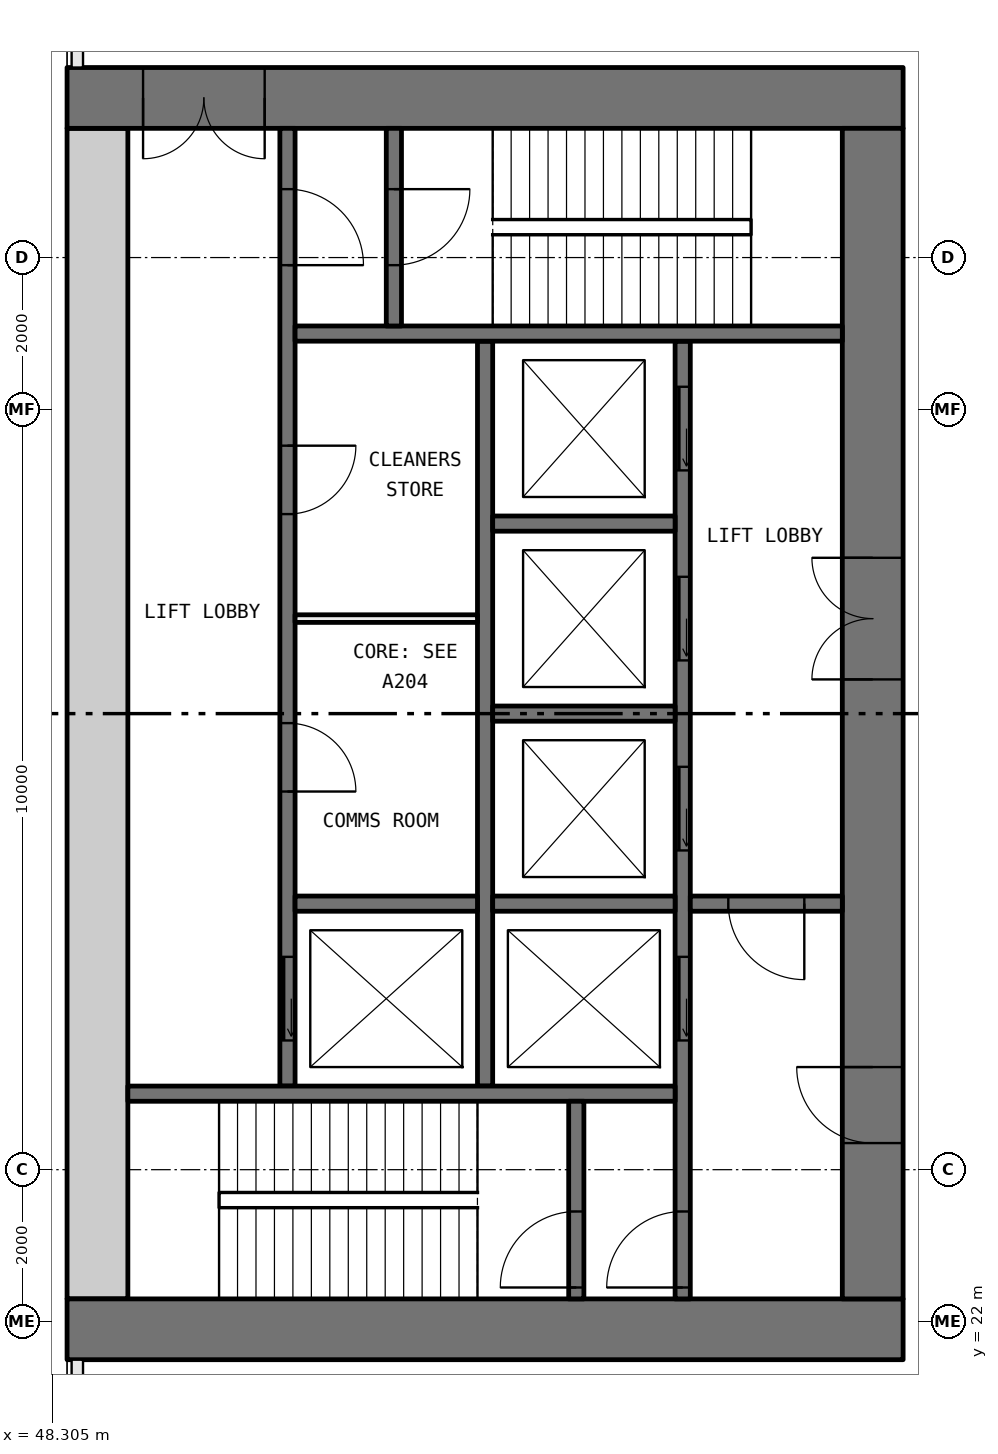
"""IFC4 building model, lengths in metres.
Left out: names, types, materials, properties, quantities, classifications, styles, units other than length and angle.
Written with IfcOpenShell. Run it as: python <this file> out.ifc"""

import sys

from ifc_helpers import new_model, si_unit, direction, frame, frame_2d, origin, place, context, subcontext, project, spatial, rectangle, extrude, element, fill, save


model = new_model("IFC4")
c1 = context("Model", 3, precision=1e-05, world=origin(), true_north=direction((0.0, 1.0)))
c2 = subcontext(c1, "Body", "Model", "MODEL_VIEW")
j1 = project(units=[si_unit("LENGTHUNIT", "METRE"), si_unit("PLANEANGLEUNIT", "RADIAN")], contexts=[c1])
p1 = place(None, origin())
s1 = spatial("IfcSite", under=j1, at=p1, CompositionType="ELEMENT")
p2 = place(p1, origin())
s2 = spatial("IfcBuilding", under=s1, at=p2, CompositionType="ELEMENT")
p3 = place(p2, frame((0.0, 0.0, 18.0)))
s3 = spatial("IfcBuildingStorey", under=s2, at=p3, CompositionType="ELEMENT", Elevation=18.0)
p4 = place(p3, frame((59.5, 21.9, 0.0), z_axis=(0.0, 0.0, 1.0), x_axis=(-1.0, 0.0, 0.0)))
e1 = element("IfcWall", 1, at=p4, inside=s3, PredefinedType="SHEAR", context=c2, shape_type="SweptSolid", body=[
    extrude(rectangle(XDim=11.0, YDim=0.8, at=frame_2d((5.5, 0.0))), origin(), (0.0, 0.0, 1.0), 5.6),
])
p5 = place(p3, frame((59.5, 38.1, 0.0), z_axis=(0.0, 0.0, 1.0), x_axis=(-1.0, 0.0, 0.0)))
e2 = element("IfcWall", 2, at=p5, inside=s3, PredefinedType="SHEAR", context=c2, shape_type="SweptSolid", body=[
    extrude(rectangle(XDim=11.0, YDim=0.8, at=frame_2d((5.5, 0.0))), origin(), (0.0, 0.0, 1.0), 5.6),
])
p6 = place(p5, frame((8.4, 0.0, 0.0)))
e3 = element("IfcOpeningElement", 3, at=p6, cuts=e2, PredefinedType="OPENING", context=c2, shape_type="SweptSolid", body=[
    extrude(rectangle(XDim=1.6, YDim=2.1, at=frame_2d((0.8, 1.05))), frame((0.0, 0.41, 0.0), z_axis=(0.0, -1.0, 0.0), x_axis=(1.0, 0.0, 0.0)), (0.0, 0.0, 1.0), 0.82),
])
p7 = place(p3, frame((59.1, 22.3, 0.0), z_axis=(0.0, 0.0, 1.0), x_axis=(0.0, 1.0, 0.0)))
e4 = element("IfcWall", 4, at=p7, inside=s3, PredefinedType="SHEAR", context=c2, shape_type="SweptSolid", body=[
    extrude(rectangle(XDim=15.4, YDim=0.8, at=frame_2d((7.7, 0.0))), origin(), (0.0, 0.0, 1.0), 5.6),
])
p8 = place(p7, frame((8.15, 0.0, 0.0)))
e5 = element("IfcOpeningElement", 5, at=p8, cuts=e4, PredefinedType="OPENING", context=c2, shape_type="SweptSolid", body=[
    extrude(rectangle(XDim=1.6, YDim=2.1, at=frame_2d((0.8, 1.05))), frame((0.0, 0.41, 0.0), z_axis=(0.0, -1.0, 0.0), x_axis=(1.0, 0.0, 0.0)), (0.0, 0.0, 1.0), 0.82),
])
p9 = place(p7, frame((2.05, 0.0, 0.0)))
e6 = element("IfcOpeningElement", 6, at=p9, cuts=e4, PredefinedType="OPENING", context=c2, shape_type="SweptSolid", body=[
    extrude(rectangle(XDim=1.0, YDim=2.1, at=frame_2d((0.5, 1.05))), frame((0.0, 0.41, 0.0), z_axis=(0.0, -1.0, 0.0), x_axis=(1.0, 0.0, 0.0)), (0.0, 0.0, 1.0), 0.82),
])
p10 = place(p3, frame((48.9, 22.3, 0.0), z_axis=(0.0, 0.0, 1.0), x_axis=(0.0, 1.0, 0.0)))
e7 = element("IfcWall", 7, at=p10, inside=s3, PredefinedType="SHEAR", context=c2, shape_type="SweptSolid", body=[
    extrude(rectangle(XDim=15.4, YDim=0.8, at=frame_2d((7.7, 0.0))), origin(), (0.0, 0.0, 1.0), 5.6),
])
p11 = place(p3, frame((56.6, 22.3, 0.0), z_axis=(0.0, 0.0, 1.0), x_axis=(0.0, 1.0, 0.0)))
e8 = element("IfcWall", 8, at=p11, inside=s3, PredefinedType="SOLIDWALL", context=c2, shape_type="SweptSolid", body=[
    extrude(rectangle(XDim=12.6, YDim=0.2, at=frame_2d((6.3, 0.0))), origin(), (0.0, 0.0, 1.0), 5.6),
])
p12 = place(p11, frame((3.4, 0.0, 0.0)))
e9 = element("IfcOpeningElement", 9, at=p12, cuts=e8, PredefinedType="OPENING", context=c2, shape_type="SweptSolid", body=[
    extrude(rectangle(XDim=1.1, YDim=2.1, at=frame_2d((0.55, 1.05))), frame((0.0, 0.11, 0.0), z_axis=(0.0, -1.0, 0.0), x_axis=(1.0, 0.0, 0.0)), (0.0, 0.0, 1.0), 0.22),
])
p13 = place(p11, frame((5.9, 0.0, 0.0)))
e10 = element("IfcOpeningElement", 10, at=p13, cuts=e8, PredefinedType="OPENING", context=c2, shape_type="SweptSolid", body=[
    extrude(rectangle(XDim=1.1, YDim=2.1, at=frame_2d((0.55, 1.05))), frame((0.0, 0.11, 0.0), z_axis=(0.0, -1.0, 0.0), x_axis=(1.0, 0.0, 0.0)), (0.0, 0.0, 1.0), 0.22),
])
p14 = place(p11, frame((8.4, 0.0, 0.0)))
e11 = element("IfcOpeningElement", 11, at=p14, cuts=e8, PredefinedType="OPENING", context=c2, shape_type="SweptSolid", body=[
    extrude(rectangle(XDim=1.1, YDim=2.1, at=frame_2d((0.55, 1.05))), frame((0.0, 0.11, 0.0), z_axis=(0.0, -1.0, 0.0), x_axis=(1.0, 0.0, 0.0)), (0.0, 0.0, 1.0), 0.22),
])
p15 = place(p11, frame((10.9, 0.0, 0.0)))
e12 = element("IfcOpeningElement", 12, at=p15, cuts=e8, PredefinedType="OPENING", context=c2, shape_type="SweptSolid", body=[
    extrude(rectangle(XDim=1.1, YDim=2.1, at=frame_2d((0.55, 1.05))), frame((0.0, 0.11, 0.0), z_axis=(0.0, -1.0, 0.0), x_axis=(1.0, 0.0, 0.0)), (0.0, 0.0, 1.0), 0.22),
])
p16 = place(p11, frame((0.15, 0.0, 0.0)))
e13 = element("IfcOpeningElement", 13, at=p16, cuts=e8, PredefinedType="OPENING", context=c2, shape_type="SweptSolid", body=[
    extrude(rectangle(XDim=1.0, YDim=2.1, at=frame_2d((0.5, 1.05))), frame((0.0, 0.11, 0.0), z_axis=(0.0, -1.0, 0.0), x_axis=(1.0, 0.0, 0.0)), (0.0, 0.0, 1.0), 0.22),
])
p17 = place(p3, frame((51.4, 25.1, 0.0), z_axis=(0.0, 0.0, 1.0), x_axis=(0.0, 1.0, 0.0)))
e14 = element("IfcWall", 14, at=p17, inside=s3, PredefinedType="SOLIDWALL", context=c2, shape_type="SweptSolid", body=[
    extrude(rectangle(XDim=12.6, YDim=0.2, at=frame_2d((6.3, 0.0))), origin(), (0.0, 0.0, 1.0), 5.6),
])
p18 = place(p17, frame((0.6, 0.0, 0.0)))
e15 = element("IfcOpeningElement", 15, at=p18, cuts=e14, PredefinedType="OPENING", context=c2, shape_type="SweptSolid", body=[
    extrude(rectangle(XDim=1.1, YDim=2.1, at=frame_2d((0.55, 1.05))), frame((0.0, 0.11, 0.0), z_axis=(0.0, -1.0, 0.0), x_axis=(1.0, 0.0, 0.0)), (0.0, 0.0, 1.0), 0.22),
])
p19 = place(p17, frame((10.8, 0.0, 0.0)))
e16 = element("IfcOpeningElement", 16, at=p19, cuts=e14, PredefinedType="OPENING", context=c2, shape_type="SweptSolid", body=[
    extrude(rectangle(XDim=1.0, YDim=2.1, at=frame_2d((0.5, 1.05))), frame((0.0, 0.11, 0.0), z_axis=(0.0, -1.0, 0.0), x_axis=(1.0, 0.0, 0.0)), (0.0, 0.0, 1.0), 0.22),
])
p20 = place(p17, frame((3.875, 0.0, 0.0)))
e17 = element("IfcOpeningElement", 17, at=p20, cuts=e14, PredefinedType="OPENING", context=c2, shape_type="SweptSolid", body=[
    extrude(rectangle(XDim=0.9, YDim=2.1, at=frame_2d((0.45, 1.05))), frame((0.0, 0.11, 0.0), z_axis=(0.0, -1.0, 0.0), x_axis=(1.0, 0.0, 0.0)), (0.0, 0.0, 1.0), 0.22),
])
p21 = place(p17, frame((7.525, 0.0, 0.0)))
e18 = element("IfcOpeningElement", 18, at=p21, cuts=e14, PredefinedType="OPENING", context=c2, shape_type="SweptSolid", body=[
    extrude(rectangle(XDim=0.9, YDim=2.1, at=frame_2d((0.45, 1.05))), frame((0.0, 0.11, 0.0), z_axis=(0.0, -1.0, 0.0), x_axis=(1.0, 0.0, 0.0)), (0.0, 0.0, 1.0), 0.22),
])
p22 = place(p3, frame((54.0, 25.1, 0.0), z_axis=(0.0, 0.0, 1.0), x_axis=(0.0, 1.0, 0.0)))
e19 = element("IfcWall", 19, at=p22, inside=s3, PredefinedType="SOLIDWALL", context=c2, shape_type="SweptSolid", body=[
    extrude(rectangle(XDim=9.8, YDim=0.2, at=frame_2d((4.9, 0.0))), origin(), (0.0, 0.0, 1.0), 5.6),
])
for number, where, z_axis, x_axis in (
    (20, (56.5, 25.0, 0.0), (0.0, 0.0, 1.0), (-1.0, 0.0, 0.0)),
    (21, (58.7, 35.0, 0.0), (0.0, 0.0, 1.0), (-1.0, 0.0, 0.0)),
):
    element("IfcWall", number, at=place(p3, frame(where, z_axis=z_axis, x_axis=x_axis)), inside=s3, PredefinedType="SOLIDWALL", context=c2, shape_type="SweptSolid", body=[
        extrude(rectangle(XDim=7.2, YDim=0.2, at=frame_2d((3.6, 0.0))), origin(), (0.0, 0.0, 1.0), 5.6),
    ])
p23 = place(p3, frame((58.7, 27.5, 0.0), z_axis=(0.0, 0.0, 1.0), x_axis=(-1.0, 0.0, 0.0)))
e22 = element("IfcWall", 22, at=p23, inside=s3, PredefinedType="SOLIDWALL", context=c2, shape_type="SweptSolid", body=[
    extrude(rectangle(XDim=2.0, YDim=0.2, at=frame_2d((1.0, 0.0))), origin(), (0.0, 0.0, 1.0), 5.6),
])
p24 = place(p23, frame((0.5, 0.0, 0.0)))
e23 = element("IfcOpeningElement", 23, at=p24, cuts=e22, PredefinedType="OPENING", context=c2, shape_type="SweptSolid", body=[
    extrude(rectangle(XDim=1.0, YDim=2.1, at=frame_2d((0.5, 1.05))), frame((0.0, 0.11, 0.0), z_axis=(0.0, -1.0, 0.0), x_axis=(1.0, 0.0, 0.0)), (0.0, 0.0, 1.0), 0.22),
])
p25 = place(p3, frame((55.2, 22.3, 0.0), z_axis=(0.0, 0.0, 1.0), x_axis=(0.0, 1.0, 0.0)))
e24 = element("IfcWall", 24, at=p25, inside=s3, PredefinedType="SOLIDWALL", context=c2, shape_type="SweptSolid", body=[
    extrude(rectangle(XDim=2.6, YDim=0.2, at=frame_2d((1.3, 0.0))), origin(), (0.0, 0.0, 1.0), 5.6),
])
p26 = place(p25, frame((0.15, 0.0, 0.0)))
e25 = element("IfcOpeningElement", 25, at=p26, cuts=e24, PredefinedType="OPENING", context=c2, shape_type="SweptSolid", body=[
    extrude(rectangle(XDim=1.0, YDim=2.1, at=frame_2d((0.5, 1.05))), frame((0.0, 0.11, 0.0), z_axis=(0.0, -1.0, 0.0), x_axis=(1.0, 0.0, 0.0)), (0.0, 0.0, 1.0), 0.22),
])
p27 = place(p3, frame((52.8, 35.1, 0.0), z_axis=(0.0, 0.0, 1.0), x_axis=(0.0, 1.0, 0.0)))
e26 = element("IfcWall", 26, at=p27, inside=s3, PredefinedType="SOLIDWALL", context=c2, shape_type="SweptSolid", body=[
    extrude(rectangle(XDim=2.6, YDim=0.2, at=frame_2d((1.3, 0.0))), origin(), (0.0, 0.0, 1.0), 5.6),
])
p28 = place(p27, frame((0.8, 0.0, 0.0)))
e27 = element("IfcOpeningElement", 27, at=p28, cuts=e26, PredefinedType="OPENING", context=c2, shape_type="SweptSolid", body=[
    extrude(rectangle(XDim=1.0, YDim=2.1, at=frame_2d((0.5, 1.05))), frame((0.0, 0.11, 0.0), z_axis=(0.0, -1.0, 0.0), x_axis=(1.0, 0.0, 0.0)), (0.0, 0.0, 1.0), 0.22),
])
for number, where, z_axis, x_axis in (
    (28, (56.5, 27.5, 0.0), (0.0, 0.0, 1.0), (-1.0, 0.0, 0.0)),
    (29, (56.5, 30.0, 0.0), (0.0, 0.0, 1.0), (-1.0, 0.0, 0.0)),
    (30, (56.5, 32.5, 0.0), (0.0, 0.0, 1.0), (-1.0, 0.0, 0.0)),
    (31, (53.9, 27.5, 0.0), (0.0, 0.0, 1.0), (-1.0, 0.0, 0.0)),
):
    element("IfcWall", number, at=place(p3, frame(where, z_axis=z_axis, x_axis=x_axis)), inside=s3, PredefinedType="SOLIDWALL", context=c2, shape_type="SweptSolid", body=[
        extrude(rectangle(XDim=2.4, YDim=0.2, at=frame_2d((1.2, 0.0))), origin(), (0.0, 0.0, 1.0), 5.6),
    ])
p29 = place(p3, frame((53.9, 31.25, 0.0), z_axis=(0.0, 0.0, 1.0), x_axis=(-1.0, 0.0, 0.0)))
e32 = element("IfcWall", 32, at=p29, inside=s3, PredefinedType="PARTITIONING", context=c2, shape_type="SweptSolid", body=[
    extrude(rectangle(XDim=2.4, YDim=0.1, at=frame_2d((1.2, 0.0))), origin(), (0.0, 0.0, 1.0), 5.6),
])
p30 = place(p18, origin())
e33 = element("IfcDoor", 33, at=p30, inside=s3, OperationType="SLIDING_TO_LEFT", PredefinedType="DOOR", context=c2, shape_type="SweptSolid", body=[
    extrude(rectangle(XDim=1.1, YDim=2.1, at=frame_2d((0.55, 1.05))), frame((0.0, 0.025, 0.0), z_axis=(0.0, -1.0, 0.0), x_axis=(1.0, 0.0, 0.0)), (0.0, 0.0, 1.0), 0.05),
])
fill(e15, e33)
p31 = place(p12, origin())
e34 = element("IfcDoor", 34, at=p31, inside=s3, OperationType="SLIDING_TO_LEFT", PredefinedType="DOOR", context=c2, shape_type="SweptSolid", body=[
    extrude(rectangle(XDim=1.1, YDim=2.1, at=frame_2d((0.55, 1.05))), frame((0.0, 0.025, 0.0), z_axis=(0.0, -1.0, 0.0), x_axis=(1.0, 0.0, 0.0)), (0.0, 0.0, 1.0), 0.05),
])
fill(e9, e34)
p32 = place(p13, origin())
e35 = element("IfcDoor", 35, at=p32, inside=s3, OperationType="SLIDING_TO_LEFT", PredefinedType="DOOR", context=c2, shape_type="SweptSolid", body=[
    extrude(rectangle(XDim=1.1, YDim=2.1, at=frame_2d((0.55, 1.05))), frame((0.0, 0.025, 0.0), z_axis=(0.0, -1.0, 0.0), x_axis=(1.0, 0.0, 0.0)), (0.0, 0.0, 1.0), 0.05),
])
fill(e10, e35)
p33 = place(p14, origin())
e36 = element("IfcDoor", 36, at=p33, inside=s3, OperationType="SLIDING_TO_LEFT", PredefinedType="DOOR", context=c2, shape_type="SweptSolid", body=[
    extrude(rectangle(XDim=1.1, YDim=2.1, at=frame_2d((0.55, 1.05))), frame((0.0, 0.025, 0.0), z_axis=(0.0, -1.0, 0.0), x_axis=(1.0, 0.0, 0.0)), (0.0, 0.0, 1.0), 0.05),
])
fill(e11, e36)
p34 = place(p15, origin())
e37 = element("IfcDoor", 37, at=p34, inside=s3, OperationType="SLIDING_TO_LEFT", PredefinedType="DOOR", context=c2, shape_type="SweptSolid", body=[
    extrude(rectangle(XDim=1.1, YDim=2.1, at=frame_2d((0.55, 1.05))), frame((0.0, 0.025, 0.0), z_axis=(0.0, -1.0, 0.0), x_axis=(1.0, 0.0, 0.0)), (0.0, 0.0, 1.0), 0.05),
])
fill(e12, e37)
p35 = place(p26, origin())
e38 = element("IfcDoor", 38, at=p35, inside=s3, OperationType="SINGLE_SWING_RIGHT", PredefinedType="DOOR", context=c2, shape_type="SweptSolid", body=[
    extrude(rectangle(XDim=1.0, YDim=2.1, at=frame_2d((0.5, 1.05))), frame((0.0, 0.025, 0.0), z_axis=(0.0, -1.0, 0.0), x_axis=(1.0, 0.0, 0.0)), (0.0, 0.0, 1.0), 0.05),
])
fill(e25, e38)
p36 = place(p16, origin())
e39 = element("IfcDoor", 39, at=p36, inside=s3, OperationType="SINGLE_SWING_RIGHT", PredefinedType="DOOR", context=c2, shape_type="SweptSolid", body=[
    extrude(rectangle(XDim=1.0, YDim=2.1, at=frame_2d((0.5, 1.05))), frame((0.0, 0.025, 0.0), z_axis=(0.0, -1.0, 0.0), x_axis=(1.0, 0.0, 0.0)), (0.0, 0.0, 1.0), 0.05),
])
fill(e13, e39)
p37 = place(p19, frame((1.0, 0.0, 0.0), x_axis=(-1.0, 0.0, 0.0)))
e40 = element("IfcDoor", 40, at=p37, inside=s3, OperationType="SINGLE_SWING_LEFT", PredefinedType="DOOR", context=c2, shape_type="SweptSolid", body=[
    extrude(rectangle(XDim=1.0, YDim=2.1, at=frame_2d((0.5, 1.05))), frame((0.0, 0.025, 0.0), z_axis=(0.0, -1.0, 0.0), x_axis=(1.0, 0.0, 0.0)), (0.0, 0.0, 1.0), 0.05),
])
fill(e16, e40)
p38 = place(p28, frame((1.0, 0.0, 0.0), x_axis=(-1.0, 0.0, 0.0)))
e41 = element("IfcDoor", 41, at=p38, inside=s3, OperationType="SINGLE_SWING_RIGHT", PredefinedType="DOOR", context=c2, shape_type="SweptSolid", body=[
    extrude(rectangle(XDim=1.0, YDim=2.1, at=frame_2d((0.5, 1.05))), frame((0.0, 0.025, 0.0), z_axis=(0.0, -1.0, 0.0), x_axis=(1.0, 0.0, 0.0)), (0.0, 0.0, 1.0), 0.05),
])
fill(e27, e41)
p39 = place(p24, origin())
e42 = element("IfcDoor", 42, at=p39, inside=s3, OperationType="SINGLE_SWING_RIGHT", PredefinedType="DOOR", context=c2, shape_type="SweptSolid", body=[
    extrude(rectangle(XDim=1.0, YDim=2.1, at=frame_2d((0.5, 1.05))), frame((0.0, 0.025, 0.0), z_axis=(0.0, -1.0, 0.0), x_axis=(1.0, 0.0, 0.0)), (0.0, 0.0, 1.0), 0.05),
])
fill(e23, e42)
p40 = place(p8, origin())
e43 = element("IfcDoor", 43, at=p40, inside=s3, OperationType="DOUBLE_DOOR_SINGLE_SWING", PredefinedType="DOOR", context=c2, shape_type="SweptSolid", body=[
    extrude(rectangle(XDim=1.6, YDim=2.1, at=frame_2d((0.8, 1.05))), frame((0.0, 0.025, 0.0), z_axis=(0.0, -1.0, 0.0), x_axis=(1.0, 0.0, 0.0)), (0.0, 0.0, 1.0), 0.05),
])
fill(e5, e43)
p41 = place(p9, origin())
e44 = element("IfcDoor", 44, at=p41, inside=s3, OperationType="SINGLE_SWING_LEFT", PredefinedType="DOOR", context=c2, shape_type="SweptSolid", body=[
    extrude(rectangle(XDim=1.0, YDim=2.1, at=frame_2d((0.5, 1.05))), frame((0.0, 0.025, 0.0), z_axis=(0.0, -1.0, 0.0), x_axis=(1.0, 0.0, 0.0)), (0.0, 0.0, 1.0), 0.05),
])
fill(e6, e44)
p42 = place(p6, origin())
e45 = element("IfcDoor", 45, at=p42, inside=s3, OperationType="DOUBLE_DOOR_SINGLE_SWING", PredefinedType="DOOR", context=c2, shape_type="SweptSolid", body=[
    extrude(rectangle(XDim=1.6, YDim=2.1, at=frame_2d((0.8, 1.05))), frame((0.0, 0.025, 0.0), z_axis=(0.0, -1.0, 0.0), x_axis=(1.0, 0.0, 0.0)), (0.0, 0.0, 1.0), 0.05),
])
fill(e3, e45)
p43 = place(p20, frame((0.9, 0.0, 0.0), x_axis=(-1.0, 0.0, 0.0)))
e46 = element("IfcDoor", 46, at=p43, inside=s3, OperationType="SINGLE_SWING_LEFT", PredefinedType="DOOR", context=c2, shape_type="SweptSolid", body=[
    extrude(rectangle(XDim=0.9, YDim=2.1, at=frame_2d((0.45, 1.05))), frame((0.0, 0.025, 0.0), z_axis=(0.0, -1.0, 0.0), x_axis=(1.0, 0.0, 0.0)), (0.0, 0.0, 1.0), 0.05),
])
fill(e17, e46)
p44 = place(p21, frame((0.9, 0.0, 0.0), x_axis=(-1.0, 0.0, 0.0)))
e47 = element("IfcDoor", 47, at=p44, inside=s3, OperationType="SINGLE_SWING_RIGHT", PredefinedType="DOOR", context=c2, shape_type="SweptSolid", body=[
    extrude(rectangle(XDim=0.9, YDim=2.1, at=frame_2d((0.45, 1.05))), frame((0.0, 0.025, 0.0), z_axis=(0.0, -1.0, 0.0), x_axis=(1.0, 0.0, 0.0)), (0.0, 0.0, 1.0), 0.05),
])
fill(e18, e47)
save(model, sys.argv[1])
